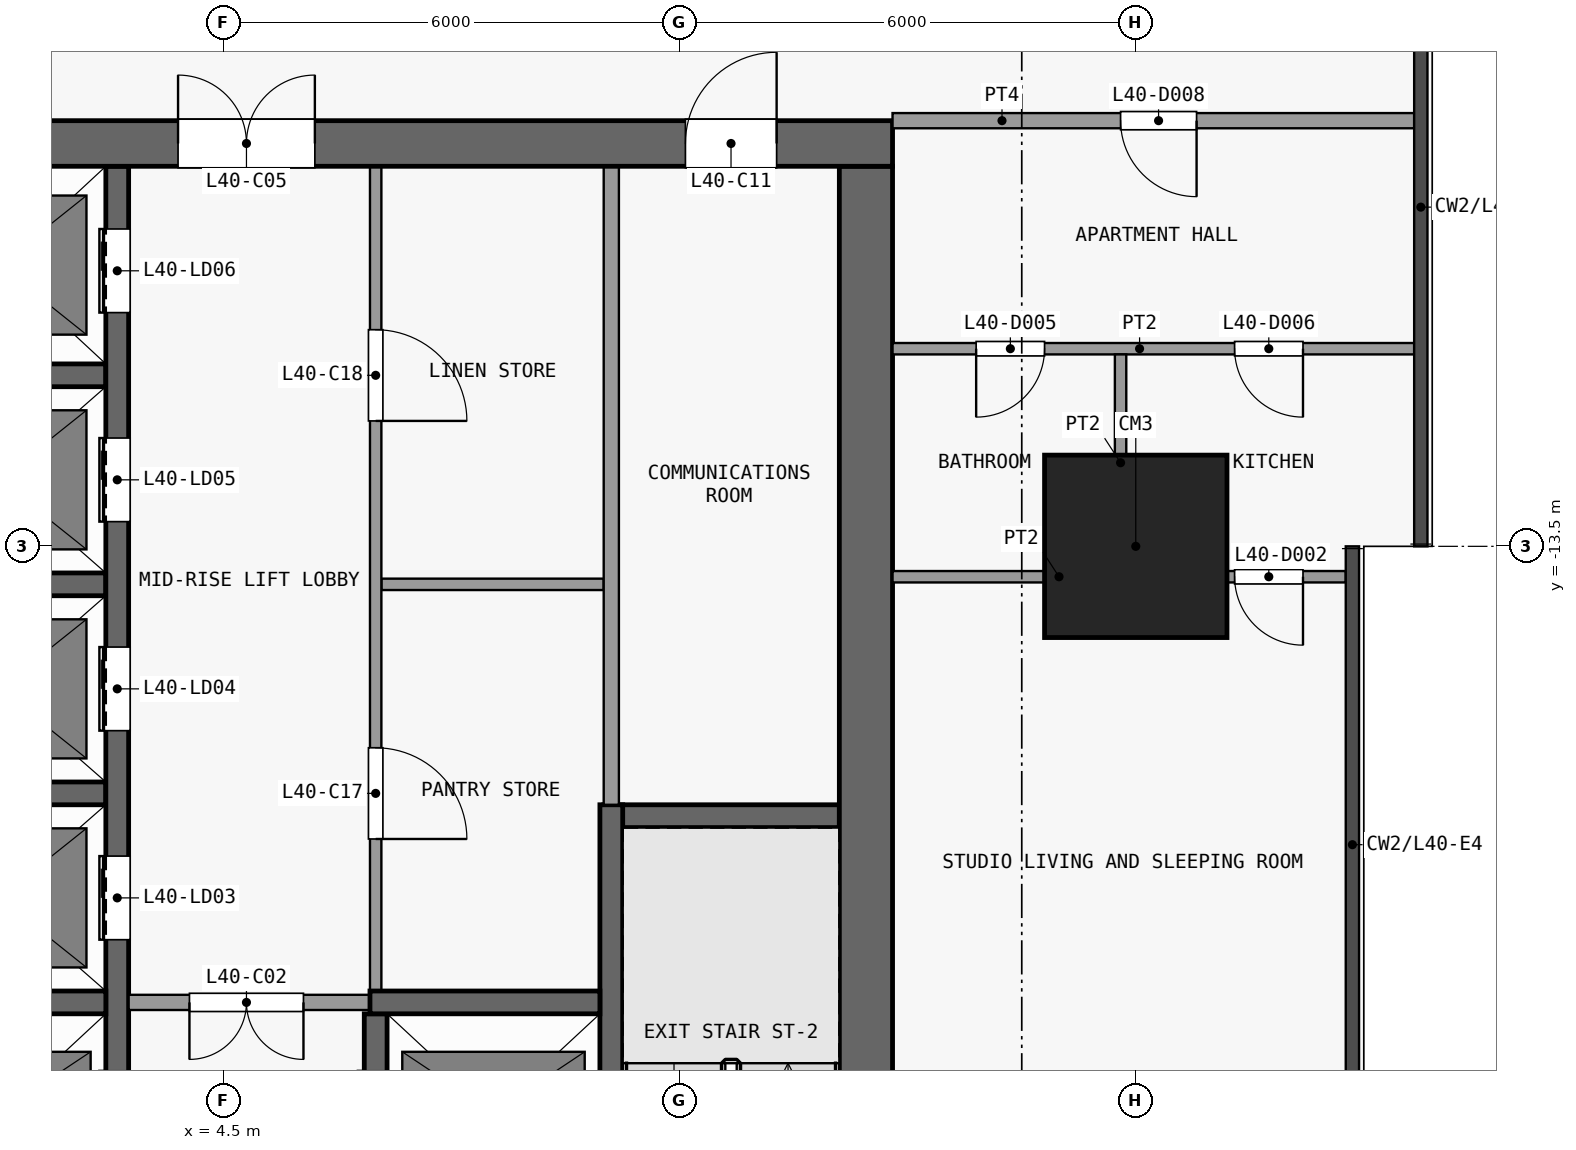
"""IFC4 building model, lengths in metres.
Left out: names, types, materials, properties, quantities, classifications, styles, units other than length and angle.
Written with IfcOpenShell. Run it as: python <this file> out.ifc"""

import sys

from ifc_helpers import new_model, si_unit, direction, frame, frame_2d, origin, origin_2d, place, context, subcontext, project, spatial, rectangle, extrude, element, fill, save


model = new_model("IFC4")
c1 = context("Model", 3, precision=1e-05, world=origin(), true_north=direction((0.0, 1.0)))
c2 = subcontext(c1, "Body", "Model", "MODEL_VIEW")
j1 = project(units=[si_unit("LENGTHUNIT", "METRE"), si_unit("PLANEANGLEUNIT", "RADIAN")], contexts=[c1])
p1 = place(None, origin())
s1 = spatial("IfcSite", under=j1, at=p1, CompositionType="ELEMENT")
p2 = place(p1, origin())
s2 = spatial("IfcBuilding", under=s1, at=p2, CompositionType="ELEMENT")
p3 = place(p2, frame((0.0, 0.0, 163.7)))
s3 = spatial("IfcBuildingStorey", under=s2, at=p3, CompositionType="ELEMENT", Elevation=163.7)
p4 = place(p3, frame((16.5, -13.5, 0.0), z_axis=(0.0, 0.0, 1.0), x_axis=(1.0, 0.0, 0.0)))
e1 = element("IfcColumn", 1, at=p4, inside=s3, PredefinedType="COLUMN", context=c2, shape_type="SweptSolid", body=[
    extrude(rectangle(XDim=2.4, YDim=2.4, at=origin_2d()), origin(), (0.0, 0.0, 1.0), 3.6),
])
p5 = place(p3, frame((-13.3, -8.2, 0.0), z_axis=(0.0, 0.0, 1.0), x_axis=(1.0, 0.0, 0.0)))
e2 = element("IfcWall", 2, at=p5, inside=s3, PredefinedType="SHEAR", context=c2, shape_type="SweptSolid", body=[
    extrude(rectangle(XDim=26.6, YDim=0.6, at=frame_2d((13.3, 0.0))), origin(), (0.0, 0.0, 1.0), 3.3),
])
p6 = place(p5, frame((7.6, 0.0, 0.0)))
e3 = element("IfcOpeningElement", 3, at=p6, cuts=e2, PredefinedType="OPENING", context=c2, shape_type="SweptSolid", body=[
    extrude(rectangle(XDim=1.8, YDim=2.1, at=frame_2d((0.9, 1.05))), frame((0.0, 0.31, 0.0), z_axis=(0.0, -1.0, 0.0), x_axis=(1.0, 0.0, 0.0)), (0.0, 0.0, 1.0), 0.62),
])
p7 = place(p5, frame((17.2, 0.0, 0.0)))
e4 = element("IfcOpeningElement", 4, at=p7, cuts=e2, PredefinedType="OPENING", context=c2, shape_type="SweptSolid", body=[
    extrude(rectangle(XDim=1.8, YDim=2.1, at=frame_2d((0.9, 1.05))), frame((0.0, 0.31, 0.0), z_axis=(0.0, -1.0, 0.0), x_axis=(1.0, 0.0, 0.0)), (0.0, 0.0, 1.0), 0.62),
])
p8 = place(p5, frame((2.525, 0.0, 0.0)))
e5 = element("IfcOpeningElement", 5, at=p8, cuts=e2, PredefinedType="OPENING", context=c2, shape_type="SweptSolid", body=[
    extrude(rectangle(XDim=0.9, YDim=2.1, at=frame_2d((0.45, 1.05))), frame((0.0, 0.31, 0.0), z_axis=(0.0, -1.0, 0.0), x_axis=(1.0, 0.0, 0.0)), (0.0, 0.0, 1.0), 0.62),
])
p9 = place(p5, frame((23.875, 0.0, 0.0)))
e6 = element("IfcOpeningElement", 6, at=p9, cuts=e2, PredefinedType="OPENING", context=c2, shape_type="SweptSolid", body=[
    extrude(rectangle(XDim=1.2, YDim=2.1, at=frame_2d((0.6, 1.05))), frame((0.0, 0.31, 0.0), z_axis=(0.0, -1.0, 0.0), x_axis=(1.0, 0.0, 0.0)), (0.0, 0.0, 1.0), 0.62),
])
p10 = place(p3, frame((12.95, -24.6, 0.0), z_axis=(0.0, 0.0, 1.0), x_axis=(0.0, 1.0, 0.0)))
e7 = element("IfcWall", 7, at=p10, inside=s3, PredefinedType="SHEAR", context=c2, shape_type="SweptSolid", body=[
    extrude(rectangle(XDim=16.1, YDim=0.7, at=frame_2d((8.05, 0.0))), origin(), (0.0, 0.0, 1.0), 3.3),
])
p11 = place(p3, frame((0.15, -19.5, 0.0), z_axis=(0.0, 0.0, 1.0), x_axis=(1.0, 0.0, 0.0)))
e8 = element("IfcWall", 8, at=p11, inside=s3, PredefinedType="SHEAR", context=c2, shape_type="SweptSolid", body=[
    extrude(rectangle(XDim=2.8, YDim=0.3, at=frame_2d((1.4, 0.0))), origin(), (0.0, 0.0, 1.0), 3.3),
])
p12 = place(p3, frame((6.575, -19.5, 0.0), z_axis=(0.0, 0.0, 1.0), x_axis=(-1.0, 0.0, 0.0)))
e9 = element("IfcWall", 9, at=p12, inside=s3, PredefinedType="PARTITIONING", context=c2, shape_type="SweptSolid", body=[
    extrude(rectangle(XDim=3.325, YDim=0.2, at=frame_2d((1.663, 0.0))), origin(), (0.0, 0.0, 1.0), 3.3),
])
p13 = place(p12, frame((1.025, 0.0, 0.0)))
e10 = element("IfcOpeningElement", 10, at=p13, cuts=e9, PredefinedType="OPENING", context=c2, shape_type="SweptSolid", body=[
    extrude(rectangle(XDim=1.5, YDim=2.1, at=frame_2d((0.75, 1.05))), frame((0.0, 0.11, 0.0), z_axis=(0.0, -1.0, 0.0), x_axis=(1.0, 0.0, 0.0)), (0.0, 0.0, 1.0), 0.22),
])
p14 = place(p3, frame((6.425, -19.5, 0.0), z_axis=(0.0, 0.0, 1.0), x_axis=(1.0, 0.0, 0.0)))
e11 = element("IfcWall", 11, at=p14, inside=s3, PredefinedType="SHEAR", context=c2, shape_type="SweptSolid", body=[
    extrude(rectangle(XDim=3.025, YDim=0.3, at=frame_2d((1.512, 0.0))), origin(), (0.0, 0.0, 1.0), 3.3),
])
p15 = place(p3, frame((9.5, -17.05, 0.0), z_axis=(0.0, 0.0, 1.0), x_axis=(1.0, 0.0, 0.0)))
e12 = element("IfcWall", 12, at=p15, inside=s3, PredefinedType="SHEAR", context=c2, shape_type="SweptSolid", body=[
    extrude(rectangle(XDim=3.1, YDim=0.3, at=frame_2d((1.55, 0.0))), origin(), (0.0, 0.0, 1.0), 3.3),
])
for number, where, z_axis, x_axis in (
    (13, (0.15, -16.75, 0.0), (0.0, 0.0, 1.0), (1.0, 0.0, 0.0)),
    (14, (0.15, -14.0, 0.0), (0.0, 0.0, 1.0), (1.0, 0.0, 0.0)),
):
    element("IfcWall", number, at=place(p3, frame(where, z_axis=z_axis, x_axis=x_axis)), inside=s3, PredefinedType="SHEAR", context=c2, shape_type="SweptSolid", body=[
        extrude(rectangle(XDim=2.8, YDim=0.3, at=frame_2d((1.4, 0.0))), origin(), (0.0, 0.0, 1.0), 3.3),
    ])
p16 = place(p3, frame((6.575, -14.0, 0.0), z_axis=(0.0, 0.0, 1.0), x_axis=(1.0, 0.0, 0.0)))
e15 = element("IfcWall", 15, at=p16, inside=s3, PredefinedType="PARTITIONING", context=c2, shape_type="SweptSolid", body=[
    extrude(rectangle(XDim=2.925, YDim=0.15, at=frame_2d((1.462, 0.0))), origin(), (0.0, 0.0, 1.0), 3.3),
])
p17 = place(p3, frame((0.15, -11.25, 0.0), z_axis=(0.0, 0.0, 1.0), x_axis=(1.0, 0.0, 0.0)))
e16 = element("IfcWall", 16, at=p17, inside=s3, PredefinedType="SHEAR", context=c2, shape_type="SweptSolid", body=[
    extrude(rectangle(XDim=2.8, YDim=0.3, at=frame_2d((1.4, 0.0))), origin(), (0.0, 0.0, 1.0), 3.3),
])
p18 = place(p3, frame((3.1, -22.55, 0.0), z_axis=(0.0, 0.0, 1.0), x_axis=(0.0, 1.0, 0.0)))
e17 = element("IfcWall", 17, at=p18, inside=s3, PredefinedType="SHEAR", context=c2, shape_type="SweptSolid", body=[
    extrude(rectangle(XDim=14.05, YDim=0.3, at=frame_2d((7.025, 0.0))), origin(), (0.0, 0.0, 1.0), 3.3),
])
p19 = place(p18, frame((1.05, 0.0, 0.0)))
e18 = element("IfcOpeningElement", 18, at=p19, cuts=e17, PredefinedType="OPENING", context=c2, shape_type="SweptSolid", body=[
    extrude(rectangle(XDim=1.1, YDim=2.1, at=frame_2d((0.55, 1.05))), frame((0.0, 0.16, 0.0), z_axis=(0.0, -1.0, 0.0), x_axis=(1.0, 0.0, 0.0)), (0.0, 0.0, 1.0), 0.32),
])
p20 = place(p18, frame((3.875, 0.0, 0.0)))
e19 = element("IfcOpeningElement", 19, at=p20, cuts=e17, PredefinedType="OPENING", context=c2, shape_type="SweptSolid", body=[
    extrude(rectangle(XDim=1.1, YDim=2.1, at=frame_2d((0.55, 1.05))), frame((0.0, 0.16, 0.0), z_axis=(0.0, -1.0, 0.0), x_axis=(1.0, 0.0, 0.0)), (0.0, 0.0, 1.0), 0.32),
])
p21 = place(p18, frame((6.625, 0.0, 0.0)))
e20 = element("IfcOpeningElement", 20, at=p21, cuts=e17, PredefinedType="OPENING", context=c2, shape_type="SweptSolid", body=[
    extrude(rectangle(XDim=1.1, YDim=2.1, at=frame_2d((0.55, 1.05))), frame((0.0, 0.16, 0.0), z_axis=(0.0, -1.0, 0.0), x_axis=(1.0, 0.0, 0.0)), (0.0, 0.0, 1.0), 0.32),
])
p22 = place(p18, frame((9.375, 0.0, 0.0)))
e21 = element("IfcOpeningElement", 21, at=p22, cuts=e17, PredefinedType="OPENING", context=c2, shape_type="SweptSolid", body=[
    extrude(rectangle(XDim=1.1, YDim=2.1, at=frame_2d((0.55, 1.05))), frame((0.0, 0.16, 0.0), z_axis=(0.0, -1.0, 0.0), x_axis=(1.0, 0.0, 0.0)), (0.0, 0.0, 1.0), 0.32),
])
p23 = place(p18, frame((12.125, 0.0, 0.0)))
e22 = element("IfcOpeningElement", 22, at=p23, cuts=e17, PredefinedType="OPENING", context=c2, shape_type="SweptSolid", body=[
    extrude(rectangle(XDim=1.1, YDim=2.1, at=frame_2d((0.55, 1.05))), frame((0.0, 0.16, 0.0), z_axis=(0.0, -1.0, 0.0), x_axis=(1.0, 0.0, 0.0)), (0.0, 0.0, 1.0), 0.32),
])
p24 = place(p3, frame((6.5, -22.25, 0.0), z_axis=(0.0, 0.0, 1.0), x_axis=(0.0, 1.0, 0.0)))
e23 = element("IfcWall", 23, at=p24, inside=s3, PredefinedType="SHEAR", context=c2, shape_type="SweptSolid", body=[
    extrude(rectangle(XDim=2.6, YDim=0.3, at=frame_2d((1.3, 0.0))), origin(), (0.0, 0.0, 1.0), 3.3),
])
p25 = place(p24, frame((0.75, 0.0, 0.0)))
e24 = element("IfcOpeningElement", 24, at=p25, cuts=e23, PredefinedType="OPENING", context=c2, shape_type="SweptSolid", body=[
    extrude(rectangle(XDim=1.1, YDim=2.1, at=frame_2d((0.55, 1.05))), frame((0.0, 0.16, 0.0), z_axis=(0.0, -1.0, 0.0), x_axis=(1.0, 0.0, 0.0)), (0.0, 0.0, 1.0), 0.32),
])
p26 = place(p3, frame((6.5, -8.5, 0.0), z_axis=(0.0, 0.0, 1.0), x_axis=(0.0, -1.0, 0.0)))
e25 = element("IfcWall", 25, at=p26, inside=s3, PredefinedType="PARTITIONING", context=c2, shape_type="SweptSolid", body=[
    extrude(rectangle(XDim=10.85, YDim=0.15, at=frame_2d((5.425, 0.0))), origin(), (0.0, 0.0, 1.0), 3.3),
])
p27 = place(p26, frame((7.65, 0.0, 0.0)))
e26 = element("IfcOpeningElement", 26, at=p27, cuts=e25, PredefinedType="OPENING", context=c2, shape_type="SweptSolid", body=[
    extrude(rectangle(XDim=1.2, YDim=2.1, at=frame_2d((0.6, 1.05))), frame((0.0, 0.085, 0.0), z_axis=(0.0, -1.0, 0.0), x_axis=(1.0, 0.0, 0.0)), (0.0, 0.0, 1.0), 0.17),
])
p28 = place(p26, frame((2.15, 0.0, 0.0)))
e27 = element("IfcOpeningElement", 27, at=p28, cuts=e25, PredefinedType="OPENING", context=c2, shape_type="SweptSolid", body=[
    extrude(rectangle(XDim=1.2, YDim=2.1, at=frame_2d((0.6, 1.05))), frame((0.0, 0.085, 0.0), z_axis=(0.0, -1.0, 0.0), x_axis=(1.0, 0.0, 0.0)), (0.0, 0.0, 1.0), 0.17),
])
p29 = place(p3, frame((9.6, -16.9, 0.0), z_axis=(0.0, 0.0, 1.0), x_axis=(0.0, -1.0, 0.0)))
e28 = element("IfcWall", 28, at=p29, inside=s3, PredefinedType="SHEAR", context=c2, shape_type="SweptSolid", body=[
    extrude(rectangle(XDim=7.7, YDim=0.3, at=frame_2d((3.85, 0.0))), origin(), (0.0, 0.0, 1.0), 3.3),
])
p30 = place(p29, frame((6.5, 0.0, 0.0)))
e29 = element("IfcOpeningElement", 29, at=p30, cuts=e28, PredefinedType="OPENING", context=c2, shape_type="SweptSolid", body=[
    extrude(rectangle(XDim=1.1, YDim=2.1, at=frame_2d((0.55, 1.05))), frame((0.0, 0.16, 0.0), z_axis=(0.0, -1.0, 0.0), x_axis=(1.0, 0.0, 0.0)), (0.0, 0.0, 1.0), 0.32),
])
p31 = place(p3, frame((9.6, -16.9, 0.0), z_axis=(0.0, 0.0, 1.0), x_axis=(0.0, 1.0, 0.0)))
e30 = element("IfcWall", 30, at=p31, inside=s3, PredefinedType="PARTITIONING", context=c2, shape_type="SweptSolid", body=[
    extrude(rectangle(XDim=8.4, YDim=0.2, at=frame_2d((4.2, 0.0))), origin(), (0.0, 0.0, 1.0), 3.3),
])
p32 = place(p3, frame((13.3, -13.9, 0.0), z_axis=(0.0, 0.0, 1.0), x_axis=(1.0, 0.0, 0.0)))
e31 = element("IfcWall", 31, at=p32, inside=s3, PredefinedType="PARTITIONING", context=c2, shape_type="SweptSolid", body=[
    extrude(rectangle(XDim=5.962, YDim=0.15, at=frame_2d((2.981, 0.0))), origin(), (0.0, 0.0, 1.0), 3.3),
])
p33 = place(p32, frame((4.5, 0.0, 0.0)))
e32 = element("IfcOpeningElement", 32, at=p33, cuts=e31, PredefinedType="OPENING", context=c2, shape_type="SweptSolid", body=[
    extrude(rectangle(XDim=0.9, YDim=2.1, at=frame_2d((0.45, 1.05))), frame((0.0, 0.085, 0.0), z_axis=(0.0, -1.0, 0.0), x_axis=(1.0, 0.0, 0.0)), (0.0, 0.0, 1.0), 0.17),
])
p34 = place(p3, frame((13.3, -10.9, 0.0), z_axis=(0.0, 0.0, 1.0), x_axis=(1.0, 0.0, 0.0)))
e33 = element("IfcWall", 33, at=p34, inside=s3, PredefinedType="PARTITIONING", context=c2, shape_type="SweptSolid", body=[
    extrude(rectangle(XDim=6.863, YDim=0.15, at=frame_2d((3.431, 0.0))), origin(), (0.0, 0.0, 1.0), 3.3),
])
p35 = place(p34, frame((1.1, 0.0, 0.0)))
e34 = element("IfcOpeningElement", 34, at=p35, cuts=e33, PredefinedType="OPENING", context=c2, shape_type="SweptSolid", body=[
    extrude(rectangle(XDim=0.9, YDim=2.1, at=frame_2d((0.45, 1.05))), frame((0.0, 0.085, 0.0), z_axis=(0.0, -1.0, 0.0), x_axis=(1.0, 0.0, 0.0)), (0.0, 0.0, 1.0), 0.17),
])
p36 = place(p34, frame((4.5, 0.0, 0.0)))
e35 = element("IfcOpeningElement", 35, at=p36, cuts=e33, PredefinedType="OPENING", context=c2, shape_type="SweptSolid", body=[
    extrude(rectangle(XDim=0.9, YDim=2.1, at=frame_2d((0.45, 1.05))), frame((0.0, 0.085, 0.0), z_axis=(0.0, -1.0, 0.0), x_axis=(1.0, 0.0, 0.0)), (0.0, 0.0, 1.0), 0.17),
])
p37 = place(p3, frame((13.3, -7.9, 0.0), z_axis=(0.0, 0.0, 1.0), x_axis=(1.0, 0.0, 0.0)))
e36 = element("IfcWall", 36, at=p37, inside=s3, PredefinedType="PARTITIONING", context=c2, shape_type="SweptSolid", body=[
    extrude(rectangle(XDim=6.863, YDim=0.2, at=frame_2d((3.431, 0.0))), origin(), (0.0, 0.0, 1.0), 3.3),
])
p38 = place(p37, frame((3.0, 0.0, 0.0)))
e37 = element("IfcOpeningElement", 37, at=p38, cuts=e36, PredefinedType="OPENING", context=c2, shape_type="SweptSolid", body=[
    extrude(rectangle(XDim=1.0, YDim=2.1, at=frame_2d((0.5, 1.05))), frame((0.0, 0.11, 0.0), z_axis=(0.0, -1.0, 0.0), x_axis=(1.0, 0.0, 0.0)), (0.0, 0.0, 1.0), 0.22),
])
p39 = place(p3, frame((16.3, -13.825, 0.0), z_axis=(0.0, 0.0, 1.0), x_axis=(0.0, 1.0, 0.0)))
e38 = element("IfcWall", 38, at=p39, inside=s3, PredefinedType="PARTITIONING", context=c2, shape_type="SweptSolid", body=[
    extrude(rectangle(XDim=2.85, YDim=0.15, at=frame_2d((1.425, 0.0))), origin(), (0.0, 0.0, 1.0), 3.3),
])
p40 = place(p20, origin())
e39 = element("IfcDoor", 39, at=p40, inside=s3, OperationType="DOUBLE_DOOR_SLIDING", PredefinedType="DOOR", context=c2, shape_type="SweptSolid", body=[
    extrude(rectangle(XDim=1.1, YDim=2.1, at=frame_2d((0.55, 1.05))), frame((0.0, 0.025, 0.0), z_axis=(0.0, -1.0, 0.0), x_axis=(1.0, 0.0, 0.0)), (0.0, 0.0, 1.0), 0.05),
])
fill(e19, e39)
p41 = place(p21, origin())
e40 = element("IfcDoor", 40, at=p41, inside=s3, OperationType="DOUBLE_DOOR_SLIDING", PredefinedType="DOOR", context=c2, shape_type="SweptSolid", body=[
    extrude(rectangle(XDim=1.1, YDim=2.1, at=frame_2d((0.55, 1.05))), frame((0.0, 0.025, 0.0), z_axis=(0.0, -1.0, 0.0), x_axis=(1.0, 0.0, 0.0)), (0.0, 0.0, 1.0), 0.05),
])
fill(e20, e40)
p42 = place(p22, origin())
e41 = element("IfcDoor", 41, at=p42, inside=s3, OperationType="DOUBLE_DOOR_SLIDING", PredefinedType="DOOR", context=c2, shape_type="SweptSolid", body=[
    extrude(rectangle(XDim=1.1, YDim=2.1, at=frame_2d((0.55, 1.05))), frame((0.0, 0.025, 0.0), z_axis=(0.0, -1.0, 0.0), x_axis=(1.0, 0.0, 0.0)), (0.0, 0.0, 1.0), 0.05),
])
fill(e21, e41)
p43 = place(p23, origin())
e42 = element("IfcDoor", 42, at=p43, inside=s3, OperationType="DOUBLE_DOOR_SLIDING", PredefinedType="DOOR", context=c2, shape_type="SweptSolid", body=[
    extrude(rectangle(XDim=1.1, YDim=2.1, at=frame_2d((0.55, 1.05))), frame((0.0, 0.025, 0.0), z_axis=(0.0, -1.0, 0.0), x_axis=(1.0, 0.0, 0.0)), (0.0, 0.0, 1.0), 0.05),
])
fill(e22, e42)
p44 = place(p13, origin())
e43 = element("IfcDoor", 43, at=p44, inside=s3, OperationType="DOUBLE_DOOR_SINGLE_SWING", PredefinedType="DOOR", context=c2, shape_type="SweptSolid", body=[
    extrude(rectangle(XDim=1.5, YDim=2.1, at=frame_2d((0.75, 1.05))), frame((0.0, 0.025, 0.0), z_axis=(0.0, -1.0, 0.0), x_axis=(1.0, 0.0, 0.0)), (0.0, 0.0, 1.0), 0.05),
])
fill(e10, e43)
p45 = place(p7, origin())
e44 = element("IfcDoor", 44, at=p45, inside=s3, OperationType="DOUBLE_DOOR_SINGLE_SWING", PredefinedType="DOOR", context=c2, shape_type="SweptSolid", body=[
    extrude(rectangle(XDim=1.8, YDim=2.1, at=frame_2d((0.9, 1.05))), frame((0.0, 0.025, 0.0), z_axis=(0.0, -1.0, 0.0), x_axis=(1.0, 0.0, 0.0)), (0.0, 0.0, 1.0), 0.05),
])
fill(e4, e44)
p46 = place(p9, origin())
e45 = element("IfcDoor", 45, at=p46, inside=s3, OperationType="SINGLE_SWING_RIGHT", PredefinedType="DOOR", context=c2, shape_type="SweptSolid", body=[
    extrude(rectangle(XDim=1.2, YDim=2.1, at=frame_2d((0.6, 1.05))), frame((0.0, 0.025, 0.0), z_axis=(0.0, -1.0, 0.0), x_axis=(1.0, 0.0, 0.0)), (0.0, 0.0, 1.0), 0.05),
])
fill(e6, e45)
p47 = place(p27, origin())
e46 = element("IfcDoor", 46, at=p47, inside=s3, OperationType="SINGLE_SWING_RIGHT", PredefinedType="DOOR", context=c2, shape_type="SweptSolid", body=[
    extrude(rectangle(XDim=1.2, YDim=2.1, at=frame_2d((0.6, 1.05))), frame((0.0, 0.025, 0.0), z_axis=(0.0, -1.0, 0.0), x_axis=(1.0, 0.0, 0.0)), (0.0, 0.0, 1.0), 0.05),
])
fill(e26, e46)
p48 = place(p28, origin())
e47 = element("IfcDoor", 47, at=p48, inside=s3, OperationType="SINGLE_SWING_RIGHT", PredefinedType="DOOR", context=c2, shape_type="SweptSolid", body=[
    extrude(rectangle(XDim=1.2, YDim=2.1, at=frame_2d((0.6, 1.05))), frame((0.0, 0.025, 0.0), z_axis=(0.0, -1.0, 0.0), x_axis=(1.0, 0.0, 0.0)), (0.0, 0.0, 1.0), 0.05),
])
fill(e27, e47)
p49 = place(p33, origin())
e48 = element("IfcDoor", 48, at=p49, inside=s3, OperationType="SINGLE_SWING_RIGHT", PredefinedType="DOOR", context=c2, shape_type="SweptSolid", body=[
    extrude(rectangle(XDim=0.9, YDim=2.1, at=frame_2d((0.45, 1.05))), frame((0.0, 0.025, 0.0), z_axis=(0.0, -1.0, 0.0), x_axis=(1.0, 0.0, 0.0)), (0.0, 0.0, 1.0), 0.05),
])
fill(e32, e48)
p50 = place(p35, origin())
e49 = element("IfcDoor", 49, at=p50, inside=s3, OperationType="SINGLE_SWING_LEFT", PredefinedType="DOOR", context=c2, shape_type="SweptSolid", body=[
    extrude(rectangle(XDim=0.9, YDim=2.1, at=frame_2d((0.45, 1.05))), frame((0.0, 0.025, 0.0), z_axis=(0.0, -1.0, 0.0), x_axis=(1.0, 0.0, 0.0)), (0.0, 0.0, 1.0), 0.05),
])
fill(e34, e49)
p51 = place(p36, origin())
e50 = element("IfcDoor", 50, at=p51, inside=s3, OperationType="SINGLE_SWING_RIGHT", PredefinedType="DOOR", context=c2, shape_type="SweptSolid", body=[
    extrude(rectangle(XDim=0.9, YDim=2.1, at=frame_2d((0.45, 1.05))), frame((0.0, 0.025, 0.0), z_axis=(0.0, -1.0, 0.0), x_axis=(1.0, 0.0, 0.0)), (0.0, 0.0, 1.0), 0.05),
])
fill(e35, e50)
p52 = place(p38, origin())
e51 = element("IfcDoor", 51, at=p52, inside=s3, OperationType="SINGLE_SWING_RIGHT", PredefinedType="DOOR", context=c2, shape_type="SweptSolid", body=[
    extrude(rectangle(XDim=1.0, YDim=2.1, at=frame_2d((0.5, 1.05))), frame((0.0, 0.025, 0.0), z_axis=(0.0, -1.0, 0.0), x_axis=(1.0, 0.0, 0.0)), (0.0, 0.0, 1.0), 0.05),
])
fill(e37, e51)
save(model, sys.argv[1])
